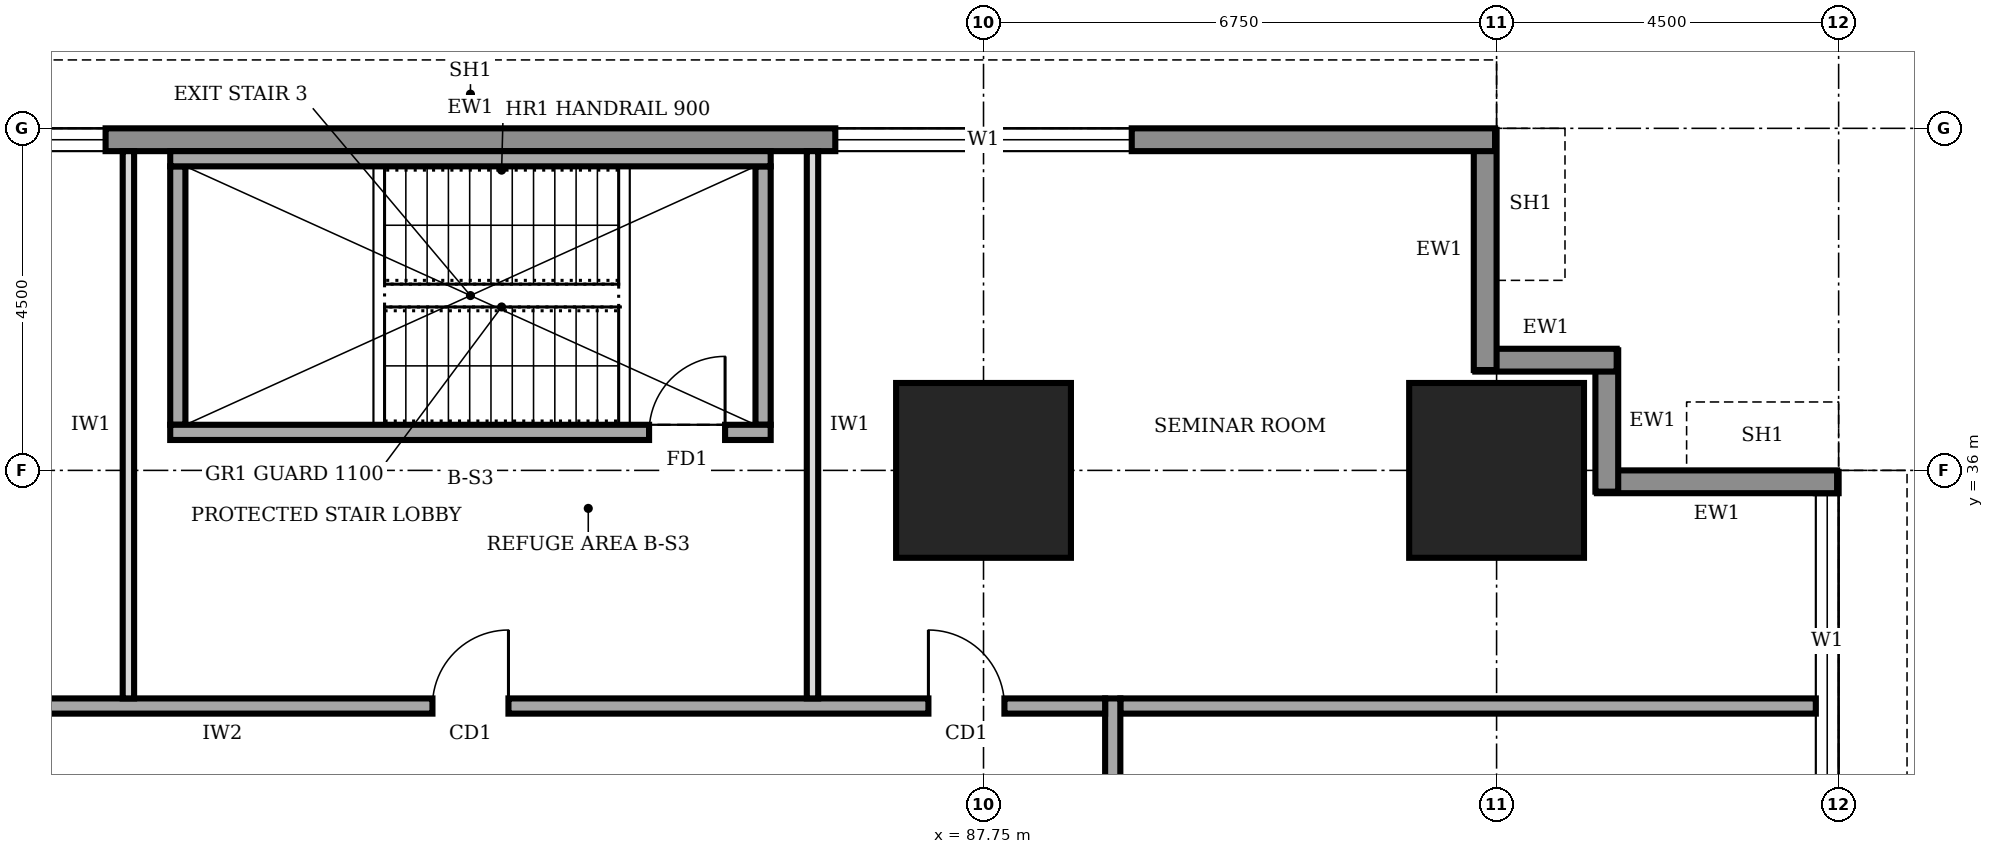
"""IFC4 building model, lengths in metres.
Left out: names, types, materials, properties, quantities, classifications, styles, units other than length and angle.
Written with IfcOpenShell. Run it as: python <this file> out.ifc"""

import sys

from ifc_helpers import new_model, si_unit, direction, frame, frame_2d, origin, origin_2d, place, context, subcontext, project, spatial, rectangle, extrude, element, fill, save


model = new_model("IFC4")
c1 = context("Model", 3, precision=1e-05, world=origin(), true_north=direction((0.0, 1.0)))
c2 = subcontext(c1, "Body", "Model", "MODEL_VIEW")
j1 = project(units=[si_unit("LENGTHUNIT", "METRE"), si_unit("PLANEANGLEUNIT", "RADIAN")], contexts=[c1])
p1 = place(None, origin())
s1 = spatial("IfcSite", under=j1, at=p1, CompositionType="ELEMENT")
p2 = place(p1, origin())
s2 = spatial("IfcBuilding", under=s1, at=p2, CompositionType="ELEMENT")
p3 = place(p2, frame((0.0, 0.0, 29.0)))
s3 = spatial("IfcBuildingStorey", under=s2, at=p3, CompositionType="ELEMENT", Elevation=29.0)
for number, where, z_axis, x_axis in (
    (1, (87.75, 36.0, 0.0), (0.0, 0.0, 1.0), (1.0, 0.0, 0.0)),
    (2, (94.5, 36.0, 0.0), (0.0, 0.0, 1.0), (1.0, 0.0, 0.0)),
):
    element("IfcColumn", number, at=place(p3, frame(where, z_axis=z_axis, x_axis=x_axis)), inside=s3, PredefinedType="COLUMN", context=c2, shape_type="SweptSolid", body=[
        extrude(rectangle(XDim=2.3, YDim=2.3, at=origin_2d()), origin(), (0.0, 0.0, 1.0), 4.0),
    ])
p4 = place(p3, frame((98.85, 4.52, 0.0), z_axis=(0.0, 0.0, 1.0), x_axis=(0.0, 1.0, 0.0)))
e3 = element("IfcWall", 3, at=p4, inside=s3, PredefinedType="STANDARD", context=c2, shape_type="SweptSolid", body=[
    extrude(rectangle(XDim=31.46, YDim=0.3, at=frame_2d((15.73, 0.0))), origin(), (0.0, 0.0, 1.0), 3.75),
])
p5 = place(p4, frame((4.78, 0.0, 0.9)))
e4 = element("IfcOpeningElement", 4, at=p5, cuts=e3, PredefinedType="OPENING", context=c2, shape_type="SweptSolid", body=[
    extrude(rectangle(XDim=3.9, YDim=2.2, at=frame_2d((1.95, 1.1))), frame((0.0, 0.16, 0.0), z_axis=(0.0, -1.0, 0.0), x_axis=(1.0, 0.0, 0.0)), (0.0, 0.0, 1.0), 0.32),
])
p6 = place(p4, frame((9.28, 0.0, 0.9)))
e5 = element("IfcOpeningElement", 5, at=p6, cuts=e3, PredefinedType="OPENING", context=c2, shape_type="SweptSolid", body=[
    extrude(rectangle(XDim=3.9, YDim=2.2, at=frame_2d((1.95, 1.1))), frame((0.0, 0.16, 0.0), z_axis=(0.0, -1.0, 0.0), x_axis=(1.0, 0.0, 0.0)), (0.0, 0.0, 1.0), 0.32),
])
p7 = place(p4, frame((13.78, 0.0, 0.9)))
e6 = element("IfcOpeningElement", 6, at=p7, cuts=e3, PredefinedType="OPENING", context=c2, shape_type="SweptSolid", body=[
    extrude(rectangle(XDim=3.9, YDim=2.2, at=frame_2d((1.95, 1.1))), frame((0.0, 0.16, 0.0), z_axis=(0.0, -1.0, 0.0), x_axis=(1.0, 0.0, 0.0)), (0.0, 0.0, 1.0), 0.32),
])
p8 = place(p4, frame((18.28, 0.0, 0.9)))
e7 = element("IfcOpeningElement", 7, at=p8, cuts=e3, PredefinedType="OPENING", context=c2, shape_type="SweptSolid", body=[
    extrude(rectangle(XDim=3.9, YDim=2.2, at=frame_2d((1.95, 1.1))), frame((0.0, 0.16, 0.0), z_axis=(0.0, -1.0, 0.0), x_axis=(1.0, 0.0, 0.0)), (0.0, 0.0, 1.0), 0.32),
])
p9 = place(p4, frame((22.78, 0.0, 0.9)))
e8 = element("IfcOpeningElement", 8, at=p9, cuts=e3, PredefinedType="OPENING", context=c2, shape_type="SweptSolid", body=[
    extrude(rectangle(XDim=3.9, YDim=2.2, at=frame_2d((1.95, 1.1))), frame((0.0, 0.16, 0.0), z_axis=(0.0, -1.0, 0.0), x_axis=(1.0, 0.0, 0.0)), (0.0, 0.0, 1.0), 0.32),
])
p10 = place(p4, frame((27.28, 0.0, 0.9)))
e9 = element("IfcOpeningElement", 9, at=p10, cuts=e3, PredefinedType="OPENING", context=c2, shape_type="SweptSolid", body=[
    extrude(rectangle(XDim=3.9, YDim=2.2, at=frame_2d((1.95, 1.1))), frame((0.0, 0.16, 0.0), z_axis=(0.0, -1.0, 0.0), x_axis=(1.0, 0.0, 0.0)), (0.0, 0.0, 1.0), 0.32),
])
p11 = place(p3, frame((98.98, 35.85, 0.0), z_axis=(0.0, 0.0, 1.0), x_axis=(-1.0, 0.0, 0.0)))
e10 = element("IfcWall", 10, at=p11, inside=s3, PredefinedType="STANDARD", context=c2, shape_type="SweptSolid", body=[
    extrude(rectangle(XDim=3.16, YDim=0.3, at=frame_2d((1.58, 0.0))), origin(), (0.0, 0.0, 1.0), 2.85),
])
for number, where, z_axis, x_axis in (
    (11, (95.95, 35.72, 0.0), (0.0, 0.0, 1.0), (0.0, 1.0, 0.0)),
    (12, (96.08, 37.45, 0.0), (0.0, 0.0, 1.0), (-1.0, 0.0, 0.0)),
):
    element("IfcWall", number, at=place(p3, frame(where, z_axis=z_axis, x_axis=x_axis)), inside=s3, PredefinedType="STANDARD", context=c2, shape_type="SweptSolid", body=[
        extrude(rectangle(XDim=1.86, YDim=0.3, at=frame_2d((0.93, 0.0))), origin(), (0.0, 0.0, 1.0), 3.75),
    ])
p12 = place(p3, frame((94.35, 37.32, 0.0), z_axis=(0.0, 0.0, 1.0), x_axis=(0.0, 1.0, 0.0)))
e13 = element("IfcWall", 13, at=p12, inside=s3, PredefinedType="STANDARD", context=c2, shape_type="SweptSolid", body=[
    extrude(rectangle(XDim=3.16, YDim=0.3, at=frame_2d((1.58, 0.0))), origin(), (0.0, 0.0, 1.0), 2.85),
])
p13 = place(p3, frame((94.48, 40.35, 0.0), z_axis=(0.0, 0.0, 1.0), x_axis=(-1.0, 0.0, 0.0)))
e14 = element("IfcWall", 14, at=p13, inside=s3, PredefinedType="STANDARD", context=c2, shape_type="SweptSolid", body=[
    extrude(rectangle(XDim=26.96, YDim=0.3, at=frame_2d((13.48, 0.0))), origin(), (0.0, 0.0, 1.0), 3.75),
])
p14 = place(p13, frame((22.78, 0.0, 0.9)))
e15 = element("IfcOpeningElement", 15, at=p14, cuts=e14, PredefinedType="OPENING", context=c2, shape_type="SweptSolid", body=[
    extrude(rectangle(XDim=3.9, YDim=2.2, at=frame_2d((1.95, 1.1))), frame((0.0, 0.16, 0.0), z_axis=(0.0, -1.0, 0.0), x_axis=(1.0, 0.0, 0.0)), (0.0, 0.0, 1.0), 0.32),
])
p15 = place(p13, frame((18.28, 0.0, 0.9)))
e16 = element("IfcOpeningElement", 16, at=p15, cuts=e14, PredefinedType="OPENING", context=c2, shape_type="SweptSolid", body=[
    extrude(rectangle(XDim=3.9, YDim=2.2, at=frame_2d((1.95, 1.1))), frame((0.0, 0.16, 0.0), z_axis=(0.0, -1.0, 0.0), x_axis=(1.0, 0.0, 0.0)), (0.0, 0.0, 1.0), 0.32),
])
p16 = place(p13, frame((4.78, 0.0, 0.9)))
e17 = element("IfcOpeningElement", 17, at=p16, cuts=e14, PredefinedType="OPENING", context=c2, shape_type="SweptSolid", body=[
    extrude(rectangle(XDim=3.9, YDim=2.2, at=frame_2d((1.95, 1.1))), frame((0.0, 0.16, 0.0), z_axis=(0.0, -1.0, 0.0), x_axis=(1.0, 0.0, 0.0)), (0.0, 0.0, 1.0), 0.32),
])
p17 = place(p3, frame((89.45, 9.2, 0.0), z_axis=(0.0, 0.0, 1.0), x_axis=(0.0, 1.0, 0.0)))
e18 = element("IfcWall", 18, at=p17, inside=s3, PredefinedType="SOLIDWALL", context=c2, shape_type="SweptSolid", body=[
    extrude(rectangle(XDim=23.8, YDim=0.2, at=frame_2d((11.9, 0.0))), origin(), (0.0, 0.0, 1.0), 3.75),
])
p18 = place(p17, frame((1.55, 0.0, 0.0)))
e19 = element("IfcOpeningElement", 19, at=p18, cuts=e18, PredefinedType="OPENING", context=c2, shape_type="SweptSolid", body=[
    extrude(rectangle(XDim=1.0, YDim=2.1, at=frame_2d((0.5, 1.05))), frame((0.0, 0.11, 0.0), z_axis=(0.0, -1.0, 0.0), x_axis=(1.0, 0.0, 0.0)), (0.0, 0.0, 1.0), 0.22),
])
p19 = place(p17, frame((5.75, 0.0, 0.0)))
e20 = element("IfcOpeningElement", 20, at=p19, cuts=e18, PredefinedType="OPENING", context=c2, shape_type="SweptSolid", body=[
    extrude(rectangle(XDim=0.9, YDim=2.1, at=frame_2d((0.45, 1.05))), frame((0.0, 0.11, 0.0), z_axis=(0.0, -1.0, 0.0), x_axis=(1.0, 0.0, 0.0)), (0.0, 0.0, 1.0), 0.22),
])
p20 = place(p17, frame((8.75, 0.0, 0.0)))
e21 = element("IfcOpeningElement", 21, at=p20, cuts=e18, PredefinedType="OPENING", context=c2, shape_type="SweptSolid", body=[
    extrude(rectangle(XDim=0.9, YDim=2.1, at=frame_2d((0.45, 1.05))), frame((0.0, 0.11, 0.0), z_axis=(0.0, -1.0, 0.0), x_axis=(1.0, 0.0, 0.0)), (0.0, 0.0, 1.0), 0.22),
])
p21 = place(p17, frame((13.6, 0.0, 0.0)))
e22 = element("IfcOpeningElement", 22, at=p21, cuts=e18, PredefinedType="OPENING", context=c2, shape_type="SweptSolid", body=[
    extrude(rectangle(XDim=0.9, YDim=2.1, at=frame_2d((0.45, 1.05))), frame((0.0, 0.11, 0.0), z_axis=(0.0, -1.0, 0.0), x_axis=(1.0, 0.0, 0.0)), (0.0, 0.0, 1.0), 0.22),
])
p22 = place(p17, frame((16.3, 0.0, 0.0)))
e23 = element("IfcOpeningElement", 23, at=p22, cuts=e18, PredefinedType="OPENING", context=c2, shape_type="SweptSolid", body=[
    extrude(rectangle(XDim=1.0, YDim=2.1, at=frame_2d((0.5, 1.05))), frame((0.0, 0.11, 0.0), z_axis=(0.0, -1.0, 0.0), x_axis=(1.0, 0.0, 0.0)), (0.0, 0.0, 1.0), 0.22),
])
p23 = place(p17, frame((10.8, 0.0, 0.0)))
e24 = element("IfcOpeningElement", 24, at=p23, cuts=e18, PredefinedType="OPENING", context=c2, shape_type="SweptSolid", body=[
    extrude(rectangle(XDim=1.0, YDim=2.1, at=frame_2d((0.5, 1.05))), frame((0.0, 0.11, 0.0), z_axis=(0.0, -1.0, 0.0), x_axis=(1.0, 0.0, 0.0)), (0.0, 0.0, 1.0), 0.22),
])
p24 = place(p17, frame((20.3, 0.0, 0.0)))
e25 = element("IfcOpeningElement", 25, at=p24, cuts=e18, PredefinedType="OPENING", context=c2, shape_type="SweptSolid", body=[
    extrude(rectangle(XDim=1.0, YDim=2.1, at=frame_2d((0.5, 1.05))), frame((0.0, 0.11, 0.0), z_axis=(0.0, -1.0, 0.0), x_axis=(1.0, 0.0, 0.0)), (0.0, 0.0, 1.0), 0.22),
])
p25 = place(p3, frame((89.35, 32.9, 0.0), z_axis=(0.0, 0.0, 1.0), x_axis=(-1.0, 0.0, 0.0)))
e26 = element("IfcWall", 26, at=p25, inside=s3, PredefinedType="SOLIDWALL", context=c2, shape_type="SweptSolid", body=[
    extrude(rectangle(XDim=16.9, YDim=0.2, at=frame_2d((8.45, 0.0))), origin(), (0.0, 0.0, 1.0), 3.75),
])
p26 = place(p25, frame((14.375, 0.0, 0.0)))
e27 = element("IfcOpeningElement", 27, at=p26, cuts=e26, PredefinedType="OPENING", context=c2, shape_type="SweptSolid", body=[
    extrude(rectangle(XDim=1.0, YDim=2.1, at=frame_2d((0.5, 1.05))), frame((0.0, 0.11, 0.0), z_axis=(0.0, -1.0, 0.0), x_axis=(1.0, 0.0, 0.0)), (0.0, 0.0, 1.0), 0.22),
])
p27 = place(p25, frame((7.85, 0.0, 0.0)))
e28 = element("IfcOpeningElement", 28, at=p27, cuts=e26, PredefinedType="OPENING", context=c2, shape_type="SweptSolid", body=[
    extrude(rectangle(XDim=1.0, YDim=2.1, at=frame_2d((0.5, 1.05))), frame((0.0, 0.11, 0.0), z_axis=(0.0, -1.0, 0.0), x_axis=(1.0, 0.0, 0.0)), (0.0, 0.0, 1.0), 0.22),
])
p28 = place(p25, frame((1.325, 0.0, 0.0)))
e29 = element("IfcOpeningElement", 29, at=p28, cuts=e26, PredefinedType="OPENING", context=c2, shape_type="SweptSolid", body=[
    extrude(rectangle(XDim=1.0, YDim=2.1, at=frame_2d((0.5, 1.05))), frame((0.0, 0.11, 0.0), z_axis=(0.0, -1.0, 0.0), x_axis=(1.0, 0.0, 0.0)), (0.0, 0.0, 1.0), 0.22),
])
p29 = place(p3, frame((89.55, 32.9, 0.0), z_axis=(0.0, 0.0, 1.0), x_axis=(1.0, 0.0, 0.0)))
e30 = element("IfcWall", 30, at=p29, inside=s3, PredefinedType="SOLIDWALL", context=c2, shape_type="SweptSolid", body=[
    extrude(rectangle(XDim=9.15, YDim=0.2, at=frame_2d((4.575, 0.0))), origin(), (0.0, 0.0, 1.0), 3.75),
])
for number, where, z_axis, x_axis in (
    (31, (76.5, 33.0, 0.0), (0.0, 0.0, 1.0), (0.0, 1.0, 0.0)),
    (32, (85.5, 33.0, 0.0), (0.0, 0.0, 1.0), (0.0, 1.0, 0.0)),
):
    element("IfcWall", number, at=place(p3, frame(where, z_axis=z_axis, x_axis=x_axis)), inside=s3, PredefinedType="PARTITIONING", context=c2, shape_type="SweptSolid", body=[
        extrude(rectangle(XDim=7.2, YDim=0.15, at=frame_2d((3.6, 0.0))), origin(), (0.0, 0.0, 1.0), 3.75),
    ])
p30 = place(p3, frame((77.05, 36.5, 0.0), z_axis=(0.0, 0.0, 1.0), x_axis=(1.0, 0.0, 0.0)))
e33 = element("IfcWall", 33, at=p30, inside=s3, PredefinedType="SOLIDWALL", context=c2, shape_type="SweptSolid", body=[
    extrude(rectangle(XDim=7.9, YDim=0.2, at=frame_2d((3.95, 0.0))), origin(), (0.0, 0.0, 1.0), 3.75),
])
p31 = place(p30, frame((6.3, 0.0, 0.0)))
e34 = element("IfcOpeningElement", 34, at=p31, cuts=e33, PredefinedType="OPENING", context=c2, shape_type="SweptSolid", body=[
    extrude(rectangle(XDim=1.0, YDim=2.1, at=frame_2d((0.5, 1.05))), frame((0.0, 0.11, 0.0), z_axis=(0.0, -1.0, 0.0), x_axis=(1.0, 0.0, 0.0)), (0.0, 0.0, 1.0), 0.22),
])
p32 = place(p3, frame((77.05, 40.1, 0.0), z_axis=(0.0, 0.0, 1.0), x_axis=(1.0, 0.0, 0.0)))
e35 = element("IfcWall", 35, at=p32, inside=s3, PredefinedType="SOLIDWALL", context=c2, shape_type="SweptSolid", body=[
    extrude(rectangle(XDim=7.9, YDim=0.2, at=frame_2d((3.95, 0.0))), origin(), (0.0, 0.0, 1.0), 3.75),
])
for number, where, z_axis, x_axis in (
    (36, (77.15, 36.6, 0.0), (0.0, 0.0, 1.0), (0.0, 1.0, 0.0)),
    (37, (84.85, 36.6, 0.0), (0.0, 0.0, 1.0), (0.0, 1.0, 0.0)),
):
    element("IfcWall", number, at=place(p3, frame(where, z_axis=z_axis, x_axis=x_axis)), inside=s3, PredefinedType="SOLIDWALL", context=c2, shape_type="SweptSolid", body=[
        extrude(rectangle(XDim=3.4, YDim=0.2, at=frame_2d((1.7, 0.0))), origin(), (0.0, 0.0, 1.0), 3.75),
    ])
p33 = place(p10, origin())
e38 = element("IfcWindow", 38, at=p33, inside=s3, PartitioningType="SINGLE_PANEL", PredefinedType="WINDOW", context=c2, shape_type="SweptSolid", body=[
    extrude(rectangle(XDim=3.9, YDim=2.2, at=frame_2d((1.95, 1.1))), frame((0.0, 0.03, 0.0), z_axis=(0.0, -1.0, 0.0), x_axis=(1.0, 0.0, 0.0)), (0.0, 0.0, 1.0), 0.06),
])
fill(e9, e38)
p34 = place(p15, origin())
e39 = element("IfcWindow", 39, at=p34, inside=s3, PartitioningType="SINGLE_PANEL", PredefinedType="WINDOW", context=c2, shape_type="SweptSolid", body=[
    extrude(rectangle(XDim=3.9, YDim=2.2, at=frame_2d((1.95, 1.1))), frame((0.0, 0.03, 0.0), z_axis=(0.0, -1.0, 0.0), x_axis=(1.0, 0.0, 0.0)), (0.0, 0.0, 1.0), 0.06),
])
fill(e16, e39)
p35 = place(p16, origin())
e40 = element("IfcWindow", 40, at=p35, inside=s3, PartitioningType="SINGLE_PANEL", PredefinedType="WINDOW", context=c2, shape_type="SweptSolid", body=[
    extrude(rectangle(XDim=3.9, YDim=2.2, at=frame_2d((1.95, 1.1))), frame((0.0, 0.03, 0.0), z_axis=(0.0, -1.0, 0.0), x_axis=(1.0, 0.0, 0.0)), (0.0, 0.0, 1.0), 0.06),
])
fill(e17, e40)
p36 = place(p27, frame((1.0, 0.0, 0.0), z_axis=(0.0, 0.0, 1.0), x_axis=(-1.0, 0.0, 0.0)))
e41 = element("IfcDoor", 41, at=p36, inside=s3, OperationType="SINGLE_SWING_RIGHT", PredefinedType="DOOR", context=c2, shape_type="SweptSolid", body=[
    extrude(rectangle(XDim=1.0, YDim=2.1, at=frame_2d((0.5, 1.05))), frame((0.0, 0.025, 0.0), z_axis=(0.0, -1.0, 0.0), x_axis=(1.0, 0.0, 0.0)), (0.0, 0.0, 1.0), 0.05),
])
fill(e28, e41)
p37 = place(p28, frame((1.0, 0.0, 0.0), z_axis=(0.0, 0.0, 1.0), x_axis=(-1.0, 0.0, 0.0)))
e42 = element("IfcDoor", 42, at=p37, inside=s3, OperationType="SINGLE_SWING_LEFT", PredefinedType="DOOR", context=c2, shape_type="SweptSolid", body=[
    extrude(rectangle(XDim=1.0, YDim=2.1, at=frame_2d((0.5, 1.05))), frame((0.0, 0.025, 0.0), z_axis=(0.0, -1.0, 0.0), x_axis=(1.0, 0.0, 0.0)), (0.0, 0.0, 1.0), 0.05),
])
fill(e29, e42)
p38 = place(p31, origin())
e43 = element("IfcDoor", 43, at=p38, inside=s3, OperationType="SINGLE_SWING_RIGHT", PredefinedType="DOOR", context=c2, shape_type="SweptSolid", body=[
    extrude(rectangle(XDim=1.0, YDim=2.1, at=frame_2d((0.5, 1.05))), frame((0.0, 0.025, 0.0), z_axis=(0.0, -1.0, 0.0), x_axis=(1.0, 0.0, 0.0)), (0.0, 0.0, 1.0), 0.05),
])
fill(e34, e43)
save(model, sys.argv[1])
